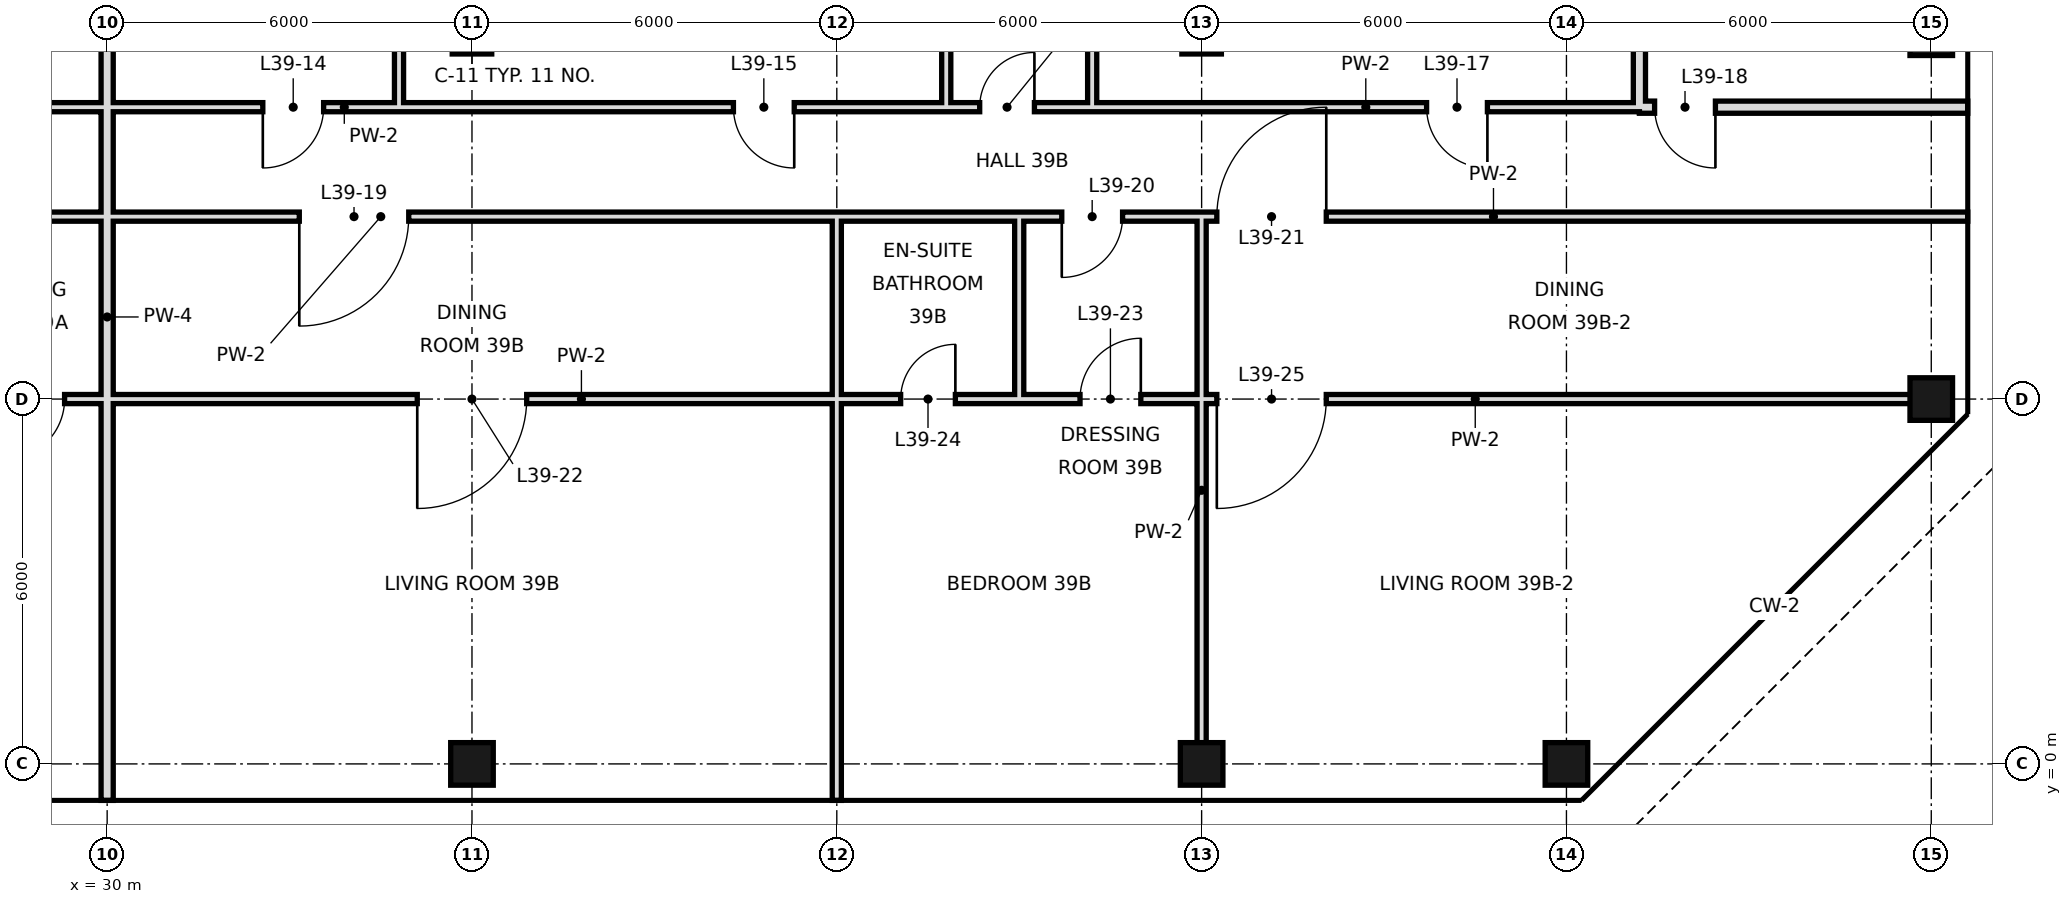
"""IFC4 building model, lengths in metres.
Left out: names, types, materials, properties, quantities, classifications, styles, units other than length and angle.
Written with IfcOpenShell. Run it as: python <this file> out.ifc"""

import sys

from ifc_helpers import new_model, si_unit, direction, frame, frame_2d, origin, origin_2d, place, context, subcontext, project, spatial, rectangle, hollow_rectangle, extrude, element, fill, save


model = new_model("IFC4")
c1 = context("Model", 3, precision=1e-05, world=origin(), true_north=direction((0.0, 1.0)))
c2 = subcontext(c1, "Body", "Model", "MODEL_VIEW")
j1 = project(units=[si_unit("LENGTHUNIT", "METRE"), si_unit("PLANEANGLEUNIT", "RADIAN")], contexts=[c1])
p1 = place(None, origin())
s1 = spatial("IfcSite", under=j1, at=p1, CompositionType="ELEMENT")
p2 = place(p1, origin())
s2 = spatial("IfcBuilding", under=s1, at=p2, CompositionType="ELEMENT")
p3 = place(p2, frame((0.0, 0.0, 170.8)))
s3 = spatial("IfcBuildingStorey", under=s2, at=p3, CompositionType="ELEMENT", Elevation=170.8)
p4 = place(p3, frame((36.0, 0.0, 0.0), z_axis=(0.0, 0.0, 1.0), x_axis=(1.0, 0.0, 0.0)))
e1 = element("IfcColumn", 1, at=p4, inside=s3, PredefinedType="COLUMN", context=c2, shape_type="SweptSolid", body=[
    extrude(hollow_rectangle(XDim=0.7, YDim=0.7, WallThickness=0.036, at=origin_2d()), origin(), (0.0, 0.0, 1.0), 3.6),
])
p5 = place(p3, frame((36.0, 12.0, 0.0), z_axis=(0.0, 0.0, 1.0), x_axis=(1.0, 0.0, 0.0)))
e2 = element("IfcColumn", 2, at=p5, inside=s3, PredefinedType="COLUMN", context=c2, shape_type="SweptSolid", body=[
    extrude(hollow_rectangle(XDim=0.65, YDim=0.65, WallThickness=0.032, at=origin_2d()), origin(), (0.0, 0.0, 1.0), 3.6),
])
p6 = place(p3, frame((48.0, 0.0, 0.0), z_axis=(0.0, 0.0, 1.0), x_axis=(1.0, 0.0, 0.0)))
e3 = element("IfcColumn", 3, at=p6, inside=s3, PredefinedType="COLUMN", context=c2, shape_type="SweptSolid", body=[
    extrude(hollow_rectangle(XDim=0.7, YDim=0.7, WallThickness=0.036, at=origin_2d()), origin(), (0.0, 0.0, 1.0), 3.6),
])
p7 = place(p3, frame((48.0, 12.0, 0.0), z_axis=(0.0, 0.0, 1.0), x_axis=(1.0, 0.0, 0.0)))
e4 = element("IfcColumn", 4, at=p7, inside=s3, PredefinedType="COLUMN", context=c2, shape_type="SweptSolid", body=[
    extrude(hollow_rectangle(XDim=0.65, YDim=0.65, WallThickness=0.032, at=origin_2d()), origin(), (0.0, 0.0, 1.0), 3.6),
])
for number, where, z_axis, x_axis in (
    (5, (54.0, 0.0, 0.0), (0.0, 0.0, 1.0), (1.0, 0.0, 0.0)),
    (6, (60.0, 6.0, 0.0), (0.0, 0.0, 1.0), (1.0, 0.0, 0.0)),
    (7, (60.0, 12.0, 0.0), (0.0, 0.0, 1.0), (1.0, 0.0, 0.0)),
):
    element("IfcColumn", number, at=place(p3, frame(where, z_axis=z_axis, x_axis=x_axis)), inside=s3, PredefinedType="COLUMN", context=c2, shape_type="SweptSolid", body=[
        extrude(hollow_rectangle(XDim=0.7, YDim=0.7, WallThickness=0.036, at=origin_2d()), origin(), (0.0, 0.0, 1.0), 3.6),
    ])
p8 = place(p3, frame((30.0, -0.6, 0.0), z_axis=(0.0, 0.0, 1.0), x_axis=(0.0, 1.0, 0.0)))
e8 = element("IfcWall", 8, at=p8, inside=s3, PredefinedType="SOLIDWALL", context=c2, shape_type="SweptSolid", body=[
    extrude(rectangle(XDim=15.9, YDim=0.2, at=frame_2d((7.95, 0.0))), origin(), (0.0, 0.0, 1.0), 2.72),
])
p9 = place(p3, frame((34.8, 10.8, 0.0), z_axis=(0.0, 0.0, 1.0), x_axis=(0.0, 1.0, 0.0)))
e9 = element("IfcWall", 9, at=p9, inside=s3, PredefinedType="PARTITIONING", context=c2, shape_type="SweptSolid", body=[
    extrude(rectangle(XDim=4.5, YDim=0.15, at=frame_2d((2.25, 0.0))), origin(), (0.0, 0.0, 1.0), 3.42),
])
p10 = place(p3, frame((42.0, -0.6, 0.0), z_axis=(0.0, 0.0, 1.0), x_axis=(0.0, 1.0, 0.0)))
e10 = element("IfcWall", 10, at=p10, inside=s3, PredefinedType="PARTITIONING", context=c2, shape_type="SweptSolid", body=[
    extrude(rectangle(XDim=6.6, YDim=0.15, at=frame_2d((3.3, 0.0))), origin(), (0.0, 0.0, 1.0), 2.72),
])
p11 = place(p3, frame((42.0, 6.0, 0.0), z_axis=(0.0, 0.0, 1.0), x_axis=(0.0, 1.0, 0.0)))
e11 = element("IfcWall", 11, at=p11, inside=s3, PredefinedType="PARTITIONING", context=c2, shape_type="SweptSolid", body=[
    extrude(rectangle(XDim=3.0, YDim=0.15, at=frame_2d((1.5, 0.0))), origin(), (0.0, 0.0, 1.0), 2.72),
])
p12 = place(p3, frame((43.8, 10.8, 0.0), z_axis=(0.0, 0.0, 1.0), x_axis=(0.0, 1.0, 0.0)))
e12 = element("IfcWall", 12, at=p12, inside=s3, PredefinedType="PARTITIONING", context=c2, shape_type="SweptSolid", body=[
    extrude(rectangle(XDim=4.5, YDim=0.15, at=frame_2d((2.25, 0.0))), origin(), (0.0, 0.0, 1.0), 3.42),
])
p13 = place(p3, frame((45.0, 6.0, 0.0), z_axis=(0.0, 0.0, 1.0), x_axis=(0.0, 1.0, 0.0)))
e13 = element("IfcWall", 13, at=p13, inside=s3, PredefinedType="PARTITIONING", context=c2, shape_type="SweptSolid", body=[
    extrude(rectangle(XDim=3.0, YDim=0.15, at=frame_2d((1.5, 0.0))), origin(), (0.0, 0.0, 1.0), 3.42),
])
p14 = place(p3, frame((46.2, 10.8, 0.0), z_axis=(0.0, 0.0, 1.0), x_axis=(0.0, 1.0, 0.0)))
e14 = element("IfcWall", 14, at=p14, inside=s3, PredefinedType="PARTITIONING", context=c2, shape_type="SweptSolid", body=[
    extrude(rectangle(XDim=4.5, YDim=0.15, at=frame_2d((2.25, 0.0))), origin(), (0.0, 0.0, 1.0), 3.42),
])
p15 = place(p3, frame((48.0, 0.0, 0.0), z_axis=(0.0, 0.0, 1.0), x_axis=(0.0, 1.0, 0.0)))
e15 = element("IfcWall", 15, at=p15, inside=s3, PredefinedType="PARTITIONING", context=c2, shape_type="SweptSolid", body=[
    extrude(rectangle(XDim=9.0, YDim=0.15, at=frame_2d((4.5, 0.0))), origin(), (0.0, 0.0, 1.0), 2.72),
])
p16 = place(p3, frame((55.2, 10.8, 0.0), z_axis=(0.0, 0.0, 1.0), x_axis=(0.0, 1.0, 0.0)))
e16 = element("IfcWall", 16, at=p16, inside=s3, PredefinedType="SOLIDWALL", context=c2, shape_type="SweptSolid", body=[
    extrude(rectangle(XDim=7.2, YDim=0.2, at=frame_2d((3.6, 0.0))), origin(), (0.0, 0.0, 1.0), 2.72),
])
p17 = place(p3, frame((55.2, 10.8, 0.0), z_axis=(0.0, 0.0, 1.0), x_axis=(1.0, 0.0, 0.0)))
e17 = element("IfcWall", 17, at=p17, inside=s3, PredefinedType="SOLIDWALL", context=c2, shape_type="SweptSolid", body=[
    extrude(rectangle(XDim=5.4, YDim=0.2, at=frame_2d((2.7, 0.0))), origin(), (0.0, 0.0, 1.0), 2.97),
])
p18 = place(p17, frame((0.25, 0.0, 0.0)))
e18 = element("IfcOpeningElement", 18, at=p18, cuts=e17, PredefinedType="OPENING", context=c2, shape_type="SweptSolid", body=[
    extrude(rectangle(XDim=1.0, YDim=2.4, at=frame_2d((0.5, 1.2))), frame((0.0, 0.11, 0.0), z_axis=(0.0, -1.0, 0.0), x_axis=(1.0, 0.0, 0.0)), (0.0, 0.0, 1.0), 0.22),
])
p19 = place(p3, frame((24.0, 10.8, 0.0), z_axis=(0.0, 0.0, 1.0), x_axis=(1.0, 0.0, 0.0)))
e19 = element("IfcWall", 19, at=p19, inside=s3, PredefinedType="PARTITIONING", context=c2, shape_type="SweptSolid", body=[
    extrude(rectangle(XDim=19.8, YDim=0.15, at=frame_2d((9.9, 0.0))), origin(), (0.0, 0.0, 1.0), 3.42),
])
p20 = place(p19, frame((2.5, 0.0, 0.0)))
e20 = element("IfcOpeningElement", 20, at=p20, cuts=e19, PredefinedType="OPENING", context=c2, shape_type="SweptSolid", body=[
    extrude(rectangle(XDim=1.0, YDim=2.4, at=frame_2d((0.5, 1.2))), frame((0.0, 0.085, 0.0), z_axis=(0.0, -1.0, 0.0), x_axis=(1.0, 0.0, 0.0)), (0.0, 0.0, 1.0), 0.17),
])
p21 = place(p19, frame((8.56, 0.0, 0.0)))
e21 = element("IfcOpeningElement", 21, at=p21, cuts=e19, PredefinedType="OPENING", context=c2, shape_type="SweptSolid", body=[
    extrude(rectangle(XDim=1.0, YDim=2.4, at=frame_2d((0.5, 1.2))), frame((0.0, 0.085, 0.0), z_axis=(0.0, -1.0, 0.0), x_axis=(1.0, 0.0, 0.0)), (0.0, 0.0, 1.0), 0.17),
])
p22 = place(p19, frame((16.3, 0.0, 0.0)))
e22 = element("IfcOpeningElement", 22, at=p22, cuts=e19, PredefinedType="OPENING", context=c2, shape_type="SweptSolid", body=[
    extrude(rectangle(XDim=1.0, YDim=2.4, at=frame_2d((0.5, 1.2))), frame((0.0, 0.085, 0.0), z_axis=(0.0, -1.0, 0.0), x_axis=(1.0, 0.0, 0.0)), (0.0, 0.0, 1.0), 0.17),
])
p23 = place(p3, frame((46.2, 10.8, 0.0), z_axis=(0.0, 0.0, 1.0), x_axis=(1.0, 0.0, 0.0)))
e23 = element("IfcWall", 23, at=p23, inside=s3, PredefinedType="PARTITIONING", context=c2, shape_type="SweptSolid", body=[
    extrude(rectangle(XDim=9.0, YDim=0.15, at=frame_2d((4.5, 0.0))), origin(), (0.0, 0.0, 1.0), 3.42),
])
p24 = place(p23, frame((5.5, 0.0, 0.0)))
e24 = element("IfcOpeningElement", 24, at=p24, cuts=e23, PredefinedType="OPENING", context=c2, shape_type="SweptSolid", body=[
    extrude(rectangle(XDim=1.0, YDim=2.4, at=frame_2d((0.5, 1.2))), frame((0.0, 0.085, 0.0), z_axis=(0.0, -1.0, 0.0), x_axis=(1.0, 0.0, 0.0)), (0.0, 0.0, 1.0), 0.17),
])
p25 = place(p3, frame((43.8, 10.8, 0.0), z_axis=(0.0, 0.0, 1.0), x_axis=(1.0, 0.0, 0.0)))
e25 = element("IfcWall", 25, at=p25, inside=s3, PredefinedType="PARTITIONING", context=c2, shape_type="SweptSolid", body=[
    extrude(rectangle(XDim=2.4, YDim=0.15, at=frame_2d((1.2, 0.0))), origin(), (0.0, 0.0, 1.0), 3.42),
])
p26 = place(p25, frame((0.55, 0.0, 0.0)))
e26 = element("IfcOpeningElement", 26, at=p26, cuts=e25, PredefinedType="OPENING", context=c2, shape_type="SweptSolid", body=[
    extrude(rectangle(XDim=0.9, YDim=2.4, at=frame_2d((0.45, 1.2))), frame((0.0, 0.085, 0.0), z_axis=(0.0, -1.0, 0.0), x_axis=(1.0, 0.0, 0.0)), (0.0, 0.0, 1.0), 0.17),
])
p27 = place(p3, frame((27.0, 6.0, 0.0), z_axis=(0.0, 0.0, 1.0), x_axis=(1.0, 0.0, 0.0)))
e27 = element("IfcWall", 27, at=p27, inside=s3, PredefinedType="PARTITIONING", context=c2, shape_type="SweptSolid", body=[
    extrude(rectangle(XDim=15.0, YDim=0.15, at=frame_2d((7.5, 0.0))), origin(), (0.0, 0.0, 1.0), 2.97),
])
p28 = place(p27, frame((1.3, 0.0, 0.0)))
e28 = element("IfcOpeningElement", 28, at=p28, cuts=e27, PredefinedType="OPENING", context=c2, shape_type="SweptSolid", body=[
    extrude(rectangle(XDim=1.0, YDim=2.4, at=frame_2d((0.5, 1.2))), frame((0.0, 0.085, 0.0), z_axis=(0.0, -1.0, 0.0), x_axis=(1.0, 0.0, 0.0)), (0.0, 0.0, 1.0), 0.17),
])
p29 = place(p27, frame((8.1, 0.0, 0.0)))
e29 = element("IfcOpeningElement", 29, at=p29, cuts=e27, PredefinedType="OPENING", context=c2, shape_type="SweptSolid", body=[
    extrude(rectangle(XDim=1.8, YDim=2.4, at=frame_2d((0.9, 1.2))), frame((0.0, 0.085, 0.0), z_axis=(0.0, -1.0, 0.0), x_axis=(1.0, 0.0, 0.0)), (0.0, 0.0, 1.0), 0.17),
])
p30 = place(p3, frame((45.0, 6.0, 0.0), z_axis=(0.0, 0.0, 1.0), x_axis=(1.0, 0.0, 0.0)))
e30 = element("IfcWall", 30, at=p30, inside=s3, PredefinedType="PARTITIONING", context=c2, shape_type="SweptSolid", body=[
    extrude(rectangle(XDim=15.0, YDim=0.15, at=frame_2d((7.5, 0.0))), origin(), (0.0, 0.0, 1.0), 2.72),
])
p31 = place(p30, frame((1.0, 0.0, 0.0)))
e31 = element("IfcOpeningElement", 31, at=p31, cuts=e30, PredefinedType="OPENING", context=c2, shape_type="SweptSolid", body=[
    extrude(rectangle(XDim=1.0, YDim=2.4, at=frame_2d((0.5, 1.2))), frame((0.0, 0.085, 0.0), z_axis=(0.0, -1.0, 0.0), x_axis=(1.0, 0.0, 0.0)), (0.0, 0.0, 1.0), 0.17),
])
p32 = place(p30, frame((3.25, 0.0, 0.0)))
e32 = element("IfcOpeningElement", 32, at=p32, cuts=e30, PredefinedType="OPENING", context=c2, shape_type="SweptSolid", body=[
    extrude(rectangle(XDim=1.8, YDim=2.4, at=frame_2d((0.9, 1.2))), frame((0.0, 0.085, 0.0), z_axis=(0.0, -1.0, 0.0), x_axis=(1.0, 0.0, 0.0)), (0.0, 0.0, 1.0), 0.17),
])
p33 = place(p3, frame((42.0, 6.0, 0.0), z_axis=(0.0, 0.0, 1.0), x_axis=(1.0, 0.0, 0.0)))
e33 = element("IfcWall", 33, at=p33, inside=s3, PredefinedType="PARTITIONING", context=c2, shape_type="SweptSolid", body=[
    extrude(rectangle(XDim=3.0, YDim=0.15, at=frame_2d((1.5, 0.0))), origin(), (0.0, 0.0, 1.0), 2.97),
])
p34 = place(p33, frame((1.05, 0.0, 0.0)))
e34 = element("IfcOpeningElement", 34, at=p34, cuts=e33, PredefinedType="OPENING", context=c2, shape_type="SweptSolid", body=[
    extrude(rectangle(XDim=0.9, YDim=2.4, at=frame_2d((0.45, 1.2))), frame((0.0, 0.085, 0.0), z_axis=(0.0, -1.0, 0.0), x_axis=(1.0, 0.0, 0.0)), (0.0, 0.0, 1.0), 0.17),
])
p35 = place(p3, frame((27.0, 9.0, 0.0), z_axis=(0.0, 0.0, 1.0), x_axis=(1.0, 0.0, 0.0)))
e35 = element("IfcWall", 35, at=p35, inside=s3, PredefinedType="PARTITIONING", context=c2, shape_type="SweptSolid", body=[
    extrude(rectangle(XDim=15.0, YDim=0.15, at=frame_2d((7.5, 0.0))), origin(), (0.0, 0.0, 1.0), 3.42),
])
p36 = place(p35, frame((1.0, 0.0, 0.0)))
e36 = element("IfcOpeningElement", 36, at=p36, cuts=e35, PredefinedType="OPENING", context=c2, shape_type="SweptSolid", body=[
    extrude(rectangle(XDim=1.0, YDim=2.4, at=frame_2d((0.5, 1.2))), frame((0.0, 0.085, 0.0), z_axis=(0.0, -1.0, 0.0), x_axis=(1.0, 0.0, 0.0)), (0.0, 0.0, 1.0), 0.17),
])
p37 = place(p35, frame((6.16, 0.0, 0.0)))
e37 = element("IfcOpeningElement", 37, at=p37, cuts=e35, PredefinedType="OPENING", context=c2, shape_type="SweptSolid", body=[
    extrude(rectangle(XDim=1.8, YDim=2.4, at=frame_2d((0.9, 1.2))), frame((0.0, 0.085, 0.0), z_axis=(0.0, -1.0, 0.0), x_axis=(1.0, 0.0, 0.0)), (0.0, 0.0, 1.0), 0.17),
])
p38 = place(p3, frame((45.0, 9.0, 0.0), z_axis=(0.0, 0.0, 1.0), x_axis=(1.0, 0.0, 0.0)))
e38 = element("IfcWall", 38, at=p38, inside=s3, PredefinedType="PARTITIONING", context=c2, shape_type="SweptSolid", body=[
    extrude(rectangle(XDim=15.6, YDim=0.15, at=frame_2d((7.8, 0.0))), origin(), (0.0, 0.0, 1.0), 3.42),
])
p39 = place(p38, frame((0.7, 0.0, 0.0)))
e39 = element("IfcOpeningElement", 39, at=p39, cuts=e38, PredefinedType="OPENING", context=c2, shape_type="SweptSolid", body=[
    extrude(rectangle(XDim=1.0, YDim=2.4, at=frame_2d((0.5, 1.2))), frame((0.0, 0.085, 0.0), z_axis=(0.0, -1.0, 0.0), x_axis=(1.0, 0.0, 0.0)), (0.0, 0.0, 1.0), 0.17),
])
p40 = place(p38, frame((3.25, 0.0, 0.0)))
e40 = element("IfcOpeningElement", 40, at=p40, cuts=e38, PredefinedType="OPENING", context=c2, shape_type="SweptSolid", body=[
    extrude(rectangle(XDim=1.8, YDim=2.4, at=frame_2d((0.9, 1.2))), frame((0.0, 0.085, 0.0), z_axis=(0.0, -1.0, 0.0), x_axis=(1.0, 0.0, 0.0)), (0.0, 0.0, 1.0), 0.17),
])
p41 = place(p3, frame((42.0, 9.0, 0.0), z_axis=(0.0, 0.0, 1.0), x_axis=(1.0, 0.0, 0.0)))
e41 = element("IfcWall", 41, at=p41, inside=s3, PredefinedType="PARTITIONING", context=c2, shape_type="SweptSolid", body=[
    extrude(rectangle(XDim=3.0, YDim=0.15, at=frame_2d((1.5, 0.0))), origin(), (0.0, 0.0, 1.0), 3.42),
])
p42 = place(p28, frame((1.0, 0.0, 0.0), z_axis=(0.0, 0.0, 1.0), x_axis=(-1.0, 0.0, 0.0)))
e42 = element("IfcDoor", 42, at=p42, inside=s3, OperationType="SINGLE_SWING_RIGHT", PredefinedType="DOOR", context=c2, shape_type="SweptSolid", body=[
    extrude(rectangle(XDim=1.0, YDim=2.4, at=frame_2d((0.5, 1.2))), frame((0.0, 0.025, 0.0), z_axis=(0.0, -1.0, 0.0), x_axis=(1.0, 0.0, 0.0)), (0.0, 0.0, 1.0), 0.05),
])
fill(e28, e42)
p43 = place(p21, frame((1.0, 0.0, 0.0), z_axis=(0.0, 0.0, 1.0), x_axis=(-1.0, 0.0, 0.0)))
e43 = element("IfcDoor", 43, at=p43, inside=s3, OperationType="SINGLE_SWING_RIGHT", PredefinedType="DOOR", context=c2, shape_type="SweptSolid", body=[
    extrude(rectangle(XDim=1.0, YDim=2.4, at=frame_2d((0.5, 1.2))), frame((0.0, 0.025, 0.0), z_axis=(0.0, -1.0, 0.0), x_axis=(1.0, 0.0, 0.0)), (0.0, 0.0, 1.0), 0.05),
])
fill(e21, e43)
p44 = place(p22, origin())
e44 = element("IfcDoor", 44, at=p44, inside=s3, OperationType="SINGLE_SWING_RIGHT", PredefinedType="DOOR", context=c2, shape_type="SweptSolid", body=[
    extrude(rectangle(XDim=1.0, YDim=2.4, at=frame_2d((0.5, 1.2))), frame((0.0, 0.025, 0.0), z_axis=(0.0, -1.0, 0.0), x_axis=(1.0, 0.0, 0.0)), (0.0, 0.0, 1.0), 0.05),
])
fill(e22, e44)
p45 = place(p26, frame((0.9, 0.0, 0.0), z_axis=(0.0, 0.0, 1.0), x_axis=(-1.0, 0.0, 0.0)))
e45 = element("IfcDoor", 45, at=p45, inside=s3, OperationType="SINGLE_SWING_LEFT", PredefinedType="DOOR", context=c2, shape_type="SweptSolid", body=[
    extrude(rectangle(XDim=0.9, YDim=2.4, at=frame_2d((0.45, 1.2))), frame((0.0, 0.025, 0.0), z_axis=(0.0, -1.0, 0.0), x_axis=(1.0, 0.0, 0.0)), (0.0, 0.0, 1.0), 0.05),
])
fill(e26, e45)
p46 = place(p24, origin())
e46 = element("IfcDoor", 46, at=p46, inside=s3, OperationType="SINGLE_SWING_RIGHT", PredefinedType="DOOR", context=c2, shape_type="SweptSolid", body=[
    extrude(rectangle(XDim=1.0, YDim=2.4, at=frame_2d((0.5, 1.2))), frame((0.0, 0.025, 0.0), z_axis=(0.0, -1.0, 0.0), x_axis=(1.0, 0.0, 0.0)), (0.0, 0.0, 1.0), 0.05),
])
fill(e24, e46)
p47 = place(p18, origin())
e47 = element("IfcDoor", 47, at=p47, inside=s3, OperationType="SINGLE_SWING_RIGHT", PredefinedType="DOOR", context=c2, shape_type="SweptSolid", body=[
    extrude(rectangle(XDim=1.0, YDim=2.4, at=frame_2d((0.5, 1.2))), frame((0.0, 0.025, 0.0), z_axis=(0.0, -1.0, 0.0), x_axis=(1.0, 0.0, 0.0)), (0.0, 0.0, 1.0), 0.05),
])
fill(e18, e47)
p48 = place(p37, frame((1.8, 0.0, 0.0), z_axis=(0.0, 0.0, 1.0), x_axis=(-1.0, 0.0, 0.0)))
e48 = element("IfcDoor", 48, at=p48, inside=s3, OperationType="SINGLE_SWING_RIGHT", PredefinedType="DOOR", context=c2, shape_type="SweptSolid", body=[
    extrude(rectangle(XDim=1.8, YDim=2.4, at=frame_2d((0.9, 1.2))), frame((0.0, 0.025, 0.0), z_axis=(0.0, -1.0, 0.0), x_axis=(1.0, 0.0, 0.0)), (0.0, 0.0, 1.0), 0.05),
])
fill(e37, e48)
p49 = place(p39, frame((1.0, 0.0, 0.0), z_axis=(0.0, 0.0, 1.0), x_axis=(-1.0, 0.0, 0.0)))
e49 = element("IfcDoor", 49, at=p49, inside=s3, OperationType="SINGLE_SWING_RIGHT", PredefinedType="DOOR", context=c2, shape_type="SweptSolid", body=[
    extrude(rectangle(XDim=1.0, YDim=2.4, at=frame_2d((0.5, 1.2))), frame((0.0, 0.025, 0.0), z_axis=(0.0, -1.0, 0.0), x_axis=(1.0, 0.0, 0.0)), (0.0, 0.0, 1.0), 0.05),
])
fill(e39, e49)
p50 = place(p40, frame((1.8, 0.0, 0.0), z_axis=(0.0, 0.0, 1.0), x_axis=(-1.0, 0.0, 0.0)))
e50 = element("IfcDoor", 50, at=p50, inside=s3, OperationType="SINGLE_SWING_LEFT", PredefinedType="DOOR", context=c2, shape_type="SweptSolid", body=[
    extrude(rectangle(XDim=1.8, YDim=2.4, at=frame_2d((0.9, 1.2))), frame((0.0, 0.025, 0.0), z_axis=(0.0, -1.0, 0.0), x_axis=(1.0, 0.0, 0.0)), (0.0, 0.0, 1.0), 0.05),
])
fill(e40, e50)
p51 = place(p29, frame((1.8, 0.0, 0.0), z_axis=(0.0, 0.0, 1.0), x_axis=(-1.0, 0.0, 0.0)))
e51 = element("IfcDoor", 51, at=p51, inside=s3, OperationType="SINGLE_SWING_RIGHT", PredefinedType="DOOR", context=c2, shape_type="SweptSolid", body=[
    extrude(rectangle(XDim=1.8, YDim=2.4, at=frame_2d((0.9, 1.2))), frame((0.0, 0.025, 0.0), z_axis=(0.0, -1.0, 0.0), x_axis=(1.0, 0.0, 0.0)), (0.0, 0.0, 1.0), 0.05),
])
fill(e29, e51)
p52 = place(p31, frame((1.0, 0.0, 0.0), z_axis=(0.0, 0.0, 1.0), x_axis=(-1.0, 0.0, 0.0)))
e52 = element("IfcDoor", 52, at=p52, inside=s3, OperationType="SINGLE_SWING_LEFT", PredefinedType="DOOR", context=c2, shape_type="SweptSolid", body=[
    extrude(rectangle(XDim=1.0, YDim=2.4, at=frame_2d((0.5, 1.2))), frame((0.0, 0.025, 0.0), z_axis=(0.0, -1.0, 0.0), x_axis=(1.0, 0.0, 0.0)), (0.0, 0.0, 1.0), 0.05),
])
fill(e31, e52)
p53 = place(p34, frame((0.9, 0.0, 0.0), z_axis=(0.0, 0.0, 1.0), x_axis=(-1.0, 0.0, 0.0)))
e53 = element("IfcDoor", 53, at=p53, inside=s3, OperationType="SINGLE_SWING_LEFT", PredefinedType="DOOR", context=c2, shape_type="SweptSolid", body=[
    extrude(rectangle(XDim=0.9, YDim=2.4, at=frame_2d((0.45, 1.2))), frame((0.0, 0.025, 0.0), z_axis=(0.0, -1.0, 0.0), x_axis=(1.0, 0.0, 0.0)), (0.0, 0.0, 1.0), 0.05),
])
fill(e34, e53)
p54 = place(p32, frame((1.8, 0.0, 0.0), z_axis=(0.0, 0.0, 1.0), x_axis=(-1.0, 0.0, 0.0)))
e54 = element("IfcDoor", 54, at=p54, inside=s3, OperationType="SINGLE_SWING_RIGHT", PredefinedType="DOOR", context=c2, shape_type="SweptSolid", body=[
    extrude(rectangle(XDim=1.8, YDim=2.4, at=frame_2d((0.9, 1.2))), frame((0.0, 0.025, 0.0), z_axis=(0.0, -1.0, 0.0), x_axis=(1.0, 0.0, 0.0)), (0.0, 0.0, 1.0), 0.05),
])
fill(e32, e54)
save(model, sys.argv[1])
